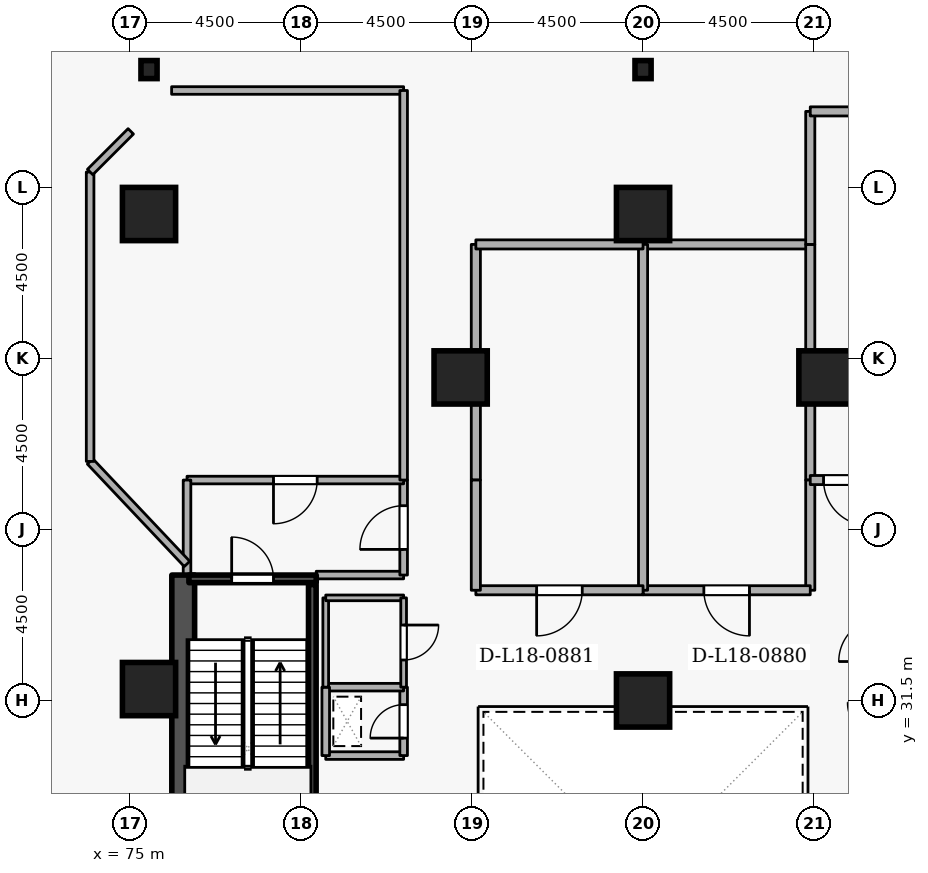
"""IFC4 building model, lengths in metres.
Left out: names, types, materials, properties, quantities, classifications, styles, units other than length and angle.
Written with IfcOpenShell. Run it as: python <this file> out.ifc"""

import sys

from ifc_helpers import new_model, si_unit, direction, frame, frame_2d, origin, origin_2d, place, context, subcontext, project, spatial, rectangle, i_section, extrude, element, fill, save


model = new_model("IFC4")
c1 = context("Model", 3, precision=1e-05, world=origin(), true_north=direction((0.0, 1.0)))
c2 = subcontext(c1, "Body", "Model", "MODEL_VIEW")
j1 = project(units=[si_unit("LENGTHUNIT", "METRE"), si_unit("PLANEANGLEUNIT", "RADIAN")], contexts=[c1])
p1 = place(None, origin())
s1 = spatial("IfcSite", under=j1, at=p1, CompositionType="ELEMENT")
p2 = place(p1, origin())
s2 = spatial("IfcBuilding", under=s1, at=p2, CompositionType="ELEMENT")
p3 = place(p2, frame((0.0, 0.0, 71.7)))
s3 = spatial("IfcBuildingStorey", under=s2, at=p3, CompositionType="ELEMENT", Elevation=71.7)
p4 = place(p3, frame((76.4, 19.2, 0.0), z_axis=(0.0, 0.0, 1.0), x_axis=(0.0, 1.0, 0.0)))
e1 = element("IfcWall", 1, at=p4, inside=s3, PredefinedType="SHEAR", context=c2, shape_type="SweptSolid", body=[
    extrude(rectangle(XDim=15.6, YDim=0.6, at=frame_2d((7.8, 0.0))), origin(), (0.0, 0.0, 1.0), 4.2),
])
for number, where, z_axis, x_axis in (
    (2, (88.5, 44.3, 0.0), (0.0, 0.0, 1.0), (1.0, 0.0, 0.0)),
    (3, (75.5, 44.3, 0.0), (0.0, 0.0, 1.0), (1.0, 0.0, 0.0)),
    (4, (93.3, 40.0, 0.0), (0.0, 0.0, 1.0), (1.0, 0.0, 0.0)),
    (5, (83.7, 40.0, 0.0), (0.0, 0.0, 1.0), (1.0, 0.0, 0.0)),
    (6, (75.5, 31.8, 0.0), (0.0, 0.0, 1.0), (1.0, 0.0, 0.0)),
    (7, (88.5, 31.5, 0.0), (0.0, 0.0, 1.0), (1.0, 0.0, 0.0)),
):
    element("IfcColumn", number, at=place(p3, frame(where, z_axis=z_axis, x_axis=x_axis)), inside=s3, PredefinedType="COLUMN", context=c2, shape_type="SweptSolid", body=[
        extrude(rectangle(XDim=1.4, YDim=1.4, at=origin_2d()), origin(), (0.0, 0.0, 1.0), 4.2),
    ])
for number, where, z_axis, x_axis in (
    (8, (88.5, 48.1, 0.0), (0.0, 0.0, 1.0), (1.0, 0.0, 0.0)),
    (9, (75.5, 48.1, 0.0), (0.0, 0.0, 1.0), (1.0, 0.0, 0.0)),
):
    element("IfcColumn", number, at=place(p3, frame(where, z_axis=z_axis, x_axis=x_axis)), inside=s3, PredefinedType="COLUMN", context=c2, shape_type="SweptSolid", body=[
        extrude(i_section(OverallWidth=0.424, OverallDepth=0.475, WebThickness=0.048, FlangeThickness=0.077, FilletRadius=0.015, at=origin_2d()), origin(), (0.0, 0.0, 1.0), 4.2),
    ])
p5 = place(p3, frame((76.55, 34.7, 0.0), z_axis=(0.0, 0.0, 1.0), x_axis=(1.0, 0.0, 0.0)))
e10 = element("IfcWall", 10, at=p5, inside=s3, PredefinedType="SHEAR", context=c2, shape_type="SweptSolid", body=[
    extrude(rectangle(XDim=3.35, YDim=0.2, at=frame_2d((1.675, 0.0))), origin(), (0.0, 0.0, 1.0), 4.2),
])
p6 = place(p5, frame((1.125, 0.0, 0.0)))
e11 = element("IfcOpeningElement", 11, at=p6, cuts=e10, PredefinedType="OPENING", context=c2, shape_type="SweptSolid", body=[
    extrude(rectangle(XDim=1.1, YDim=2.1, at=frame_2d((0.55, 1.05))), frame((0.0, 0.11, 0.0), z_axis=(0.0, -1.0, 0.0), x_axis=(1.0, 0.0, 0.0)), (0.0, 0.0, 1.0), 0.22),
])
p7 = place(p3, frame((79.797, 27.45, 0.0), z_axis=(0.0, 0.0, 1.0), x_axis=(0.0, 1.0, 0.0)))
e12 = element("IfcWall", 12, at=p7, inside=s3, PredefinedType="SHEAR", context=c2, shape_type="SweptSolid", body=[
    extrude(rectangle(XDim=7.1, YDim=0.2, at=frame_2d((3.55, 0.0))), origin(), (0.0, 0.0, 1.0), 4.2),
])
p8 = place(p3, frame((79.9, 34.8, 0.0), z_axis=(0.0, 0.0, 1.0), x_axis=(1.0, 0.0, 0.0)))
e13 = element("IfcWall", 13, at=p8, inside=s3, PredefinedType="STANDARD", context=c2, shape_type="SweptSolid", body=[
    extrude(rectangle(XDim=2.3, YDim=0.2, at=frame_2d((1.15, 0.0))), origin(), (0.0, 0.0, 1.0), 3.065),
])
p9 = place(p3, frame((82.2, 34.8, 0.0), z_axis=(0.0, 0.0, 1.0), x_axis=(0.0, 1.0, 0.0)))
e14 = element("IfcWall", 14, at=p9, inside=s3, PredefinedType="STANDARD", context=c2, shape_type="SweptSolid", body=[
    extrude(rectangle(XDim=2.5, YDim=0.2, at=frame_2d((1.25, 0.0))), origin(), (0.0, 0.0, 1.0), 3.86),
])
p10 = place(p9, frame((0.675, 0.0, 0.0)))
e15 = element("IfcOpeningElement", 15, at=p10, cuts=e14, PredefinedType="OPENING", context=c2, shape_type="SweptSolid", body=[
    extrude(rectangle(XDim=1.15, YDim=2.1, at=frame_2d((0.575, 1.05))), frame((0.0, 0.11, 0.0), z_axis=(0.0, -1.0, 0.0), x_axis=(1.0, 0.0, 0.0)), (0.0, 0.0, 1.0), 0.22),
])
p11 = place(p3, frame((82.2, 37.3, 0.0), z_axis=(0.0, 0.0, 1.0), x_axis=(-1.0, 0.0, 0.0)))
e16 = element("IfcWall", 16, at=p11, inside=s3, PredefinedType="STANDARD", context=c2, shape_type="SweptSolid", body=[
    extrude(rectangle(XDim=5.7, YDim=0.2, at=frame_2d((2.85, 0.0))), origin(), (0.0, 0.0, 1.0), 3.86),
])
p12 = place(p11, frame((2.275, 0.0, 0.0)))
e17 = element("IfcOpeningElement", 17, at=p12, cuts=e16, PredefinedType="OPENING", context=c2, shape_type="SweptSolid", body=[
    extrude(rectangle(XDim=1.15, YDim=2.1, at=frame_2d((0.575, 1.05))), frame((0.0, 0.11, 0.0), z_axis=(0.0, -1.0, 0.0), x_axis=(1.0, 0.0, 0.0)), (0.0, 0.0, 1.0), 0.22),
])
p13 = place(p3, frame((76.5, 37.3, 0.0), z_axis=(0.0, 0.0, 1.0), x_axis=(0.0, -1.0, 0.0)))
e18 = element("IfcWall", 18, at=p13, inside=s3, PredefinedType="STANDARD", context=c2, shape_type="SweptSolid", body=[
    extrude(rectangle(XDim=2.5, YDim=0.2, at=frame_2d((1.25, 0.0))), origin(), (0.0, 0.0, 1.0), 3.86),
])
p14 = place(p3, frame((80.15, 30.05, 0.0), z_axis=(0.0, 0.0, 1.0), x_axis=(1.0, 0.0, 0.0)))
e19 = element("IfcWall", 19, at=p14, inside=s3, PredefinedType="STANDARD", context=c2, shape_type="SweptSolid", body=[
    extrude(rectangle(XDim=2.05, YDim=0.2, at=frame_2d((1.025, 0.0))), origin(), (0.0, 0.0, 1.0), 3.86),
])
p15 = place(p3, frame((82.2, 30.05, 0.0), z_axis=(0.0, 0.0, 1.0), x_axis=(0.0, 1.0, 0.0)))
e20 = element("IfcWall", 20, at=p15, inside=s3, PredefinedType="STANDARD", context=c2, shape_type="SweptSolid", body=[
    extrude(rectangle(XDim=1.8, YDim=0.2, at=frame_2d((0.9, 0.0))), origin(), (0.0, 0.0, 1.0), 3.86),
])
p16 = place(p15, frame((0.46, 0.0, 0.0)))
e21 = element("IfcOpeningElement", 21, at=p16, cuts=e20, PredefinedType="OPENING", context=c2, shape_type="SweptSolid", body=[
    extrude(rectangle(XDim=0.88, YDim=2.04, at=frame_2d((0.44, 1.02))), frame((0.0, 0.11, 0.0), z_axis=(0.0, -1.0, 0.0), x_axis=(1.0, 0.0, 0.0)), (0.0, 0.0, 1.0), 0.22),
])
p17 = place(p3, frame((82.2, 31.85, 0.0), z_axis=(0.0, 0.0, 1.0), x_axis=(-1.0, 0.0, 0.0)))
e22 = element("IfcWall", 22, at=p17, inside=s3, PredefinedType="STANDARD", context=c2, shape_type="SweptSolid", body=[
    extrude(rectangle(XDim=2.05, YDim=0.2, at=frame_2d((1.025, 0.0))), origin(), (0.0, 0.0, 1.0), 3.86),
])
p18 = place(p3, frame((80.15, 31.85, 0.0), z_axis=(0.0, 0.0, 1.0), x_axis=(0.0, -1.0, 0.0)))
e23 = element("IfcWall", 23, at=p18, inside=s3, PredefinedType="STANDARD", context=c2, shape_type="SweptSolid", body=[
    extrude(rectangle(XDim=1.8, YDim=0.2, at=frame_2d((0.9, 0.0))), origin(), (0.0, 0.0, 1.0), 3.86),
])
p19 = place(p3, frame((88.5, 43.5, 0.0), z_axis=(0.0, 0.0, 1.0), x_axis=(1.0, 0.0, 0.0)))
e24 = element("IfcWall", 24, at=p19, inside=s3, PredefinedType="STANDARD", context=c2, shape_type="SweptSolid", body=[
    extrude(rectangle(XDim=4.4, YDim=0.24, at=frame_2d((2.2, 0.0))), origin(), (0.0, 0.0, 1.0), 3.86),
])
p20 = place(p3, frame((92.9, 43.5, 0.0), z_axis=(0.0, 0.0, 1.0), x_axis=(0.0, -1.0, 0.0)))
e25 = element("IfcWall", 25, at=p20, inside=s3, PredefinedType="STANDARD", context=c2, shape_type="SweptSolid", body=[
    extrude(rectangle(XDim=6.2, YDim=0.24, at=frame_2d((3.1, 0.0))), origin(), (0.0, 0.0, 1.0), 3.86),
])
p21 = place(p3, frame((92.9, 37.3, 0.0), z_axis=(0.0, 0.0, 1.0), x_axis=(0.0, -1.0, 0.0)))
e26 = element("IfcWall", 26, at=p21, inside=s3, PredefinedType="STANDARD", context=c2, shape_type="SweptSolid", body=[
    extrude(rectangle(XDim=2.9, YDim=0.24, at=frame_2d((1.45, 0.0))), origin(), (0.0, 0.0, 1.0), 3.86),
])
p22 = place(p3, frame((92.9, 34.4, 0.0), z_axis=(0.0, 0.0, 1.0), x_axis=(-1.0, 0.0, 0.0)))
e27 = element("IfcWall", 27, at=p22, inside=s3, PredefinedType="STANDARD", context=c2, shape_type="SweptSolid", body=[
    extrude(rectangle(XDim=4.4, YDim=0.24, at=frame_2d((2.2, 0.0))), origin(), (0.0, 0.0, 1.0), 3.065),
])
p23 = place(p22, frame((1.6, 0.0, 0.0)))
e28 = element("IfcOpeningElement", 28, at=p23, cuts=e27, PredefinedType="OPENING", context=c2, shape_type="SweptSolid", body=[
    extrude(rectangle(XDim=1.2, YDim=2.1, at=frame_2d((0.6, 1.05))), frame((0.0, 0.13, 0.0), z_axis=(0.0, -1.0, 0.0), x_axis=(1.0, 0.0, 0.0)), (0.0, 0.0, 1.0), 0.26),
])
p24 = place(p3, frame((88.5, 34.4, 0.0), z_axis=(0.0, 0.0, 1.0), x_axis=(0.0, 1.0, 0.0)))
e29 = element("IfcWall", 29, at=p24, inside=s3, PredefinedType="STANDARD", context=c2, shape_type="SweptSolid", body=[
    extrude(rectangle(XDim=9.1, YDim=0.24, at=frame_2d((4.55, 0.0))), origin(), (0.0, 0.0, 1.0), 2.285),
])
p25 = place(p3, frame((84.1, 37.3, 0.0), z_axis=(0.0, 0.0, 1.0), x_axis=(0.0, 1.0, 0.0)))
e30 = element("IfcWall", 30, at=p25, inside=s3, PredefinedType="STANDARD", context=c2, shape_type="SweptSolid", body=[
    extrude(rectangle(XDim=6.2, YDim=0.24, at=frame_2d((3.1, 0.0))), origin(), (0.0, 0.0, 1.0), 3.86),
])
p26 = place(p3, frame((84.1, 43.5, 0.0), z_axis=(0.0, 0.0, 1.0), x_axis=(1.0, 0.0, 0.0)))
e31 = element("IfcWall", 31, at=p26, inside=s3, PredefinedType="STANDARD", context=c2, shape_type="SweptSolid", body=[
    extrude(rectangle(XDim=4.4, YDim=0.24, at=frame_2d((2.2, 0.0))), origin(), (0.0, 0.0, 1.0), 3.86),
])
p27 = place(p3, frame((88.5, 34.4, 0.0), z_axis=(0.0, 0.0, 1.0), x_axis=(-1.0, 0.0, 0.0)))
e32 = element("IfcWall", 32, at=p27, inside=s3, PredefinedType="STANDARD", context=c2, shape_type="SweptSolid", body=[
    extrude(rectangle(XDim=4.4, YDim=0.24, at=frame_2d((2.2, 0.0))), origin(), (0.0, 0.0, 1.0), 3.065),
])
p28 = place(p27, frame((1.6, 0.0, 0.0)))
e33 = element("IfcOpeningElement", 33, at=p28, cuts=e32, PredefinedType="OPENING", context=c2, shape_type="SweptSolid", body=[
    extrude(rectangle(XDim=1.2, YDim=2.1, at=frame_2d((0.6, 1.05))), frame((0.0, 0.13, 0.0), z_axis=(0.0, -1.0, 0.0), x_axis=(1.0, 0.0, 0.0)), (0.0, 0.0, 1.0), 0.26),
])
p29 = place(p3, frame((84.1, 34.4, 0.0), z_axis=(0.0, 0.0, 1.0), x_axis=(0.0, 1.0, 0.0)))
e34 = element("IfcWall", 34, at=p29, inside=s3, PredefinedType="STANDARD", context=c2, shape_type="SweptSolid", body=[
    extrude(rectangle(XDim=2.9, YDim=0.24, at=frame_2d((1.45, 0.0))), origin(), (0.0, 0.0, 1.0), 3.86),
])
p30 = place(p3, frame((76.5, 35.093, 0.0), z_axis=(0.0, 0.0, 1.0), x_axis=(-0.68703095768, 0.726628146433, 0.0)))
e35 = element("IfcWall", 35, at=p30, inside=s3, PredefinedType="STANDARD", context=c2, shape_type="SweptSolid", body=[
    extrude(rectangle(XDim=3.712, YDim=0.2, at=frame_2d((1.856, 0.0))), origin(), (0.0, 0.0, 1.0), 3.86),
])
p31 = place(p3, frame((73.95, 37.79, 0.0), z_axis=(0.0, 0.0, 1.0), x_axis=(0.0, 1.0, 0.0)))
e36 = element("IfcWall", 36, at=p31, inside=s3, PredefinedType="STANDARD", context=c2, shape_type="SweptSolid", body=[
    extrude(rectangle(XDim=7.615, YDim=0.2, at=frame_2d((3.808, 0.0))), origin(), (0.0, 0.0, 1.0), 3.365),
])
p32 = place(p3, frame((73.95, 45.405, 0.0), z_axis=(0.0, 0.0, 1.0), x_axis=(0.707106781187, 0.707106781187, 0.0)))
e37 = element("IfcWall", 37, at=p32, inside=s3, PredefinedType="STANDARD", context=c2, shape_type="SweptSolid", body=[
    extrude(rectangle(XDim=1.513, YDim=0.2, at=frame_2d((0.757, 0.0))), origin(), (0.0, 0.0, 1.0), 3.86),
])
p33 = place(p3, frame((76.095, 47.55, 0.0), z_axis=(0.0, 0.0, 1.0), x_axis=(1.0, 0.0, 0.0)))
e38 = element("IfcWall", 38, at=p33, inside=s3, PredefinedType="STANDARD", context=c2, shape_type="SweptSolid", body=[
    extrude(rectangle(XDim=6.105, YDim=0.2, at=frame_2d((3.053, 0.0))), origin(), (0.0, 0.0, 1.0), 3.86),
])
p34 = place(p3, frame((82.2, 47.55, 0.0), z_axis=(0.0, 0.0, 1.0), x_axis=(0.0, -1.0, 0.0)))
e39 = element("IfcWall", 39, at=p34, inside=s3, PredefinedType="STANDARD", context=c2, shape_type="SweptSolid", body=[
    extrude(rectangle(XDim=10.25, YDim=0.2, at=frame_2d((5.125, 0.0))), origin(), (0.0, 0.0, 1.0), 3.86),
])
p35 = place(p3, frame((92.9, 43.5, 0.0), z_axis=(0.0, 0.0, 1.0), x_axis=(0.0, 1.0, 0.0)))
e40 = element("IfcWall", 40, at=p35, inside=s3, PredefinedType="STANDARD", context=c2, shape_type="SweptSolid", body=[
    extrude(rectangle(XDim=3.5, YDim=0.24, at=frame_2d((1.75, 0.0))), origin(), (0.0, 0.0, 1.0), 3.86),
])
p36 = place(p3, frame((92.9, 47.0, 0.0), z_axis=(0.0, 0.0, 1.0), x_axis=(1.0, 0.0, 0.0)))
e41 = element("IfcWall", 41, at=p36, inside=s3, PredefinedType="STANDARD", context=c2, shape_type="SweptSolid", body=[
    extrude(rectangle(XDim=7.4, YDim=0.24, at=frame_2d((3.7, 0.0))), origin(), (0.0, 0.0, 1.0), 3.86),
])
p37 = place(p3, frame((94.8, 37.3, 0.0), z_axis=(0.0, 0.0, 1.0), x_axis=(-1.0, 0.0, 0.0)))
e42 = element("IfcWall", 42, at=p37, inside=s3, PredefinedType="STANDARD", context=c2, shape_type="SweptSolid", body=[
    extrude(rectangle(XDim=1.9, YDim=0.24, at=frame_2d((0.95, 0.0))), origin(), (0.0, 0.0, 1.0), 3.86),
])
p38 = place(p37, frame((0.35, 0.0, 0.0)))
e43 = element("IfcOpeningElement", 43, at=p38, cuts=e42, PredefinedType="OPENING", context=c2, shape_type="SweptSolid", body=[
    extrude(rectangle(XDim=1.2, YDim=2.1, at=frame_2d((0.6, 1.05))), frame((0.0, 0.13, 0.0), z_axis=(0.0, -1.0, 0.0), x_axis=(1.0, 0.0, 0.0)), (0.0, 0.0, 1.0), 0.26),
])
p39 = place(p3, frame((80.15, 31.85, 0.0), z_axis=(0.0, 0.0, 1.0), x_axis=(0.0, 1.0, 0.0)))
e44 = element("IfcWall", 44, at=p39, inside=s3, PredefinedType="PARTITIONING", context=c2, shape_type="SweptSolid", body=[
    extrude(rectangle(XDim=2.35, YDim=0.15, at=frame_2d((1.175, 0.0))), origin(), (0.0, 0.0, 1.0), 3.86),
])
p40 = place(p3, frame((80.15, 34.2, 0.0), z_axis=(0.0, 0.0, 1.0), x_axis=(1.0, 0.0, 0.0)))
e45 = element("IfcWall", 45, at=p40, inside=s3, PredefinedType="PARTITIONING", context=c2, shape_type="SweptSolid", body=[
    extrude(rectangle(XDim=2.05, YDim=0.15, at=frame_2d((1.025, 0.0))), origin(), (0.0, 0.0, 1.0), 3.065),
])
p41 = place(p3, frame((82.2, 34.2, 0.0), z_axis=(0.0, 0.0, 1.0), x_axis=(0.0, -1.0, 0.0)))
e46 = element("IfcWall", 46, at=p41, inside=s3, PredefinedType="PARTITIONING", context=c2, shape_type="SweptSolid", body=[
    extrude(rectangle(XDim=2.35, YDim=0.15, at=frame_2d((1.175, 0.0))), origin(), (0.0, 0.0, 1.0), 3.86),
])
p42 = place(p41, frame((0.715, 0.0, 0.0)))
e47 = element("IfcOpeningElement", 47, at=p42, cuts=e46, PredefinedType="OPENING", context=c2, shape_type="SweptSolid", body=[
    extrude(rectangle(XDim=0.92, YDim=2.08, at=frame_2d((0.46, 1.04))), frame((0.0, 0.085, 0.0), z_axis=(0.0, -1.0, 0.0), x_axis=(1.0, 0.0, 0.0)), (0.0, 0.0, 1.0), 0.17),
])
p43 = place(p6, origin())
e48 = element("IfcDoor", 48, at=p43, inside=s3, OperationType="SINGLE_SWING_LEFT", PredefinedType="DOOR", context=c2, shape_type="SweptSolid", body=[
    extrude(rectangle(XDim=1.1, YDim=2.1, at=frame_2d((0.55, 1.05))), frame((0.0, 0.025, 0.0), z_axis=(0.0, -1.0, 0.0), x_axis=(1.0, 0.0, 0.0)), (0.0, 0.0, 1.0), 0.05),
])
fill(e11, e48)
p44 = place(p10, origin())
e49 = element("IfcDoor", 49, at=p44, inside=s3, OperationType="SINGLE_SWING_LEFT", PredefinedType="DOOR", context=c2, shape_type="SweptSolid", body=[
    extrude(rectangle(XDim=1.15, YDim=2.1, at=frame_2d((0.575, 1.05))), frame((0.0, 0.025, 0.0), z_axis=(0.0, -1.0, 0.0), x_axis=(1.0, 0.0, 0.0)), (0.0, 0.0, 1.0), 0.05),
])
fill(e15, e49)
p45 = place(p16, origin())
e50 = element("IfcDoor", 50, at=p45, inside=s3, OperationType="SINGLE_SWING_LEFT", PredefinedType="DOOR", context=c2, shape_type="SweptSolid", body=[
    extrude(rectangle(XDim=0.88, YDim=2.04, at=frame_2d((0.44, 1.02))), frame((0.0, 0.025, 0.0), z_axis=(0.0, -1.0, 0.0), x_axis=(1.0, 0.0, 0.0)), (0.0, 0.0, 1.0), 0.05),
])
fill(e21, e50)
p46 = place(p42, origin())
e51 = element("IfcDoor", 51, at=p46, inside=s3, OperationType="SINGLE_SWING_LEFT", PredefinedType="DOOR", context=c2, shape_type="SweptSolid", body=[
    extrude(rectangle(XDim=0.92, YDim=2.08, at=frame_2d((0.46, 1.04))), frame((0.0, 0.025, 0.0), z_axis=(0.0, -1.0, 0.0), x_axis=(1.0, 0.0, 0.0)), (0.0, 0.0, 1.0), 0.05),
])
fill(e47, e51)
p47 = place(p23, origin())
e52 = element("IfcDoor", 52, at=p47, inside=s3, OperationType="SINGLE_SWING_LEFT", PredefinedType="DOOR", context=c2, shape_type="SweptSolid", body=[
    extrude(rectangle(XDim=1.2, YDim=2.1, at=frame_2d((0.6, 1.05))), frame((0.0, 0.025, 0.0), z_axis=(0.0, -1.0, 0.0), x_axis=(1.0, 0.0, 0.0)), (0.0, 0.0, 1.0), 0.05),
])
fill(e28, e52)
p48 = place(p28, origin())
e53 = element("IfcDoor", 53, at=p48, inside=s3, OperationType="SINGLE_SWING_RIGHT", PredefinedType="DOOR", context=c2, shape_type="SweptSolid", body=[
    extrude(rectangle(XDim=1.2, YDim=2.1, at=frame_2d((0.6, 1.05))), frame((0.0, 0.025, 0.0), z_axis=(0.0, -1.0, 0.0), x_axis=(1.0, 0.0, 0.0)), (0.0, 0.0, 1.0), 0.05),
])
fill(e33, e53)
p49 = place(p12, origin())
e54 = element("IfcDoor", 54, at=p49, inside=s3, OperationType="SINGLE_SWING_RIGHT", PredefinedType="DOOR", context=c2, shape_type="SweptSolid", body=[
    extrude(rectangle(XDim=1.15, YDim=2.1, at=frame_2d((0.575, 1.05))), frame((0.0, 0.025, 0.0), z_axis=(0.0, -1.0, 0.0), x_axis=(1.0, 0.0, 0.0)), (0.0, 0.0, 1.0), 0.05),
])
fill(e17, e54)
p50 = place(p38, origin())
e55 = element("IfcDoor", 55, at=p50, inside=s3, OperationType="SINGLE_SWING_LEFT", PredefinedType="DOOR", context=c2, shape_type="SweptSolid", body=[
    extrude(rectangle(XDim=1.2, YDim=2.1, at=frame_2d((0.6, 1.05))), frame((0.0, 0.025, 0.0), z_axis=(0.0, -1.0, 0.0), x_axis=(1.0, 0.0, 0.0)), (0.0, 0.0, 1.0), 0.05),
])
fill(e43, e55)
save(model, sys.argv[1])
